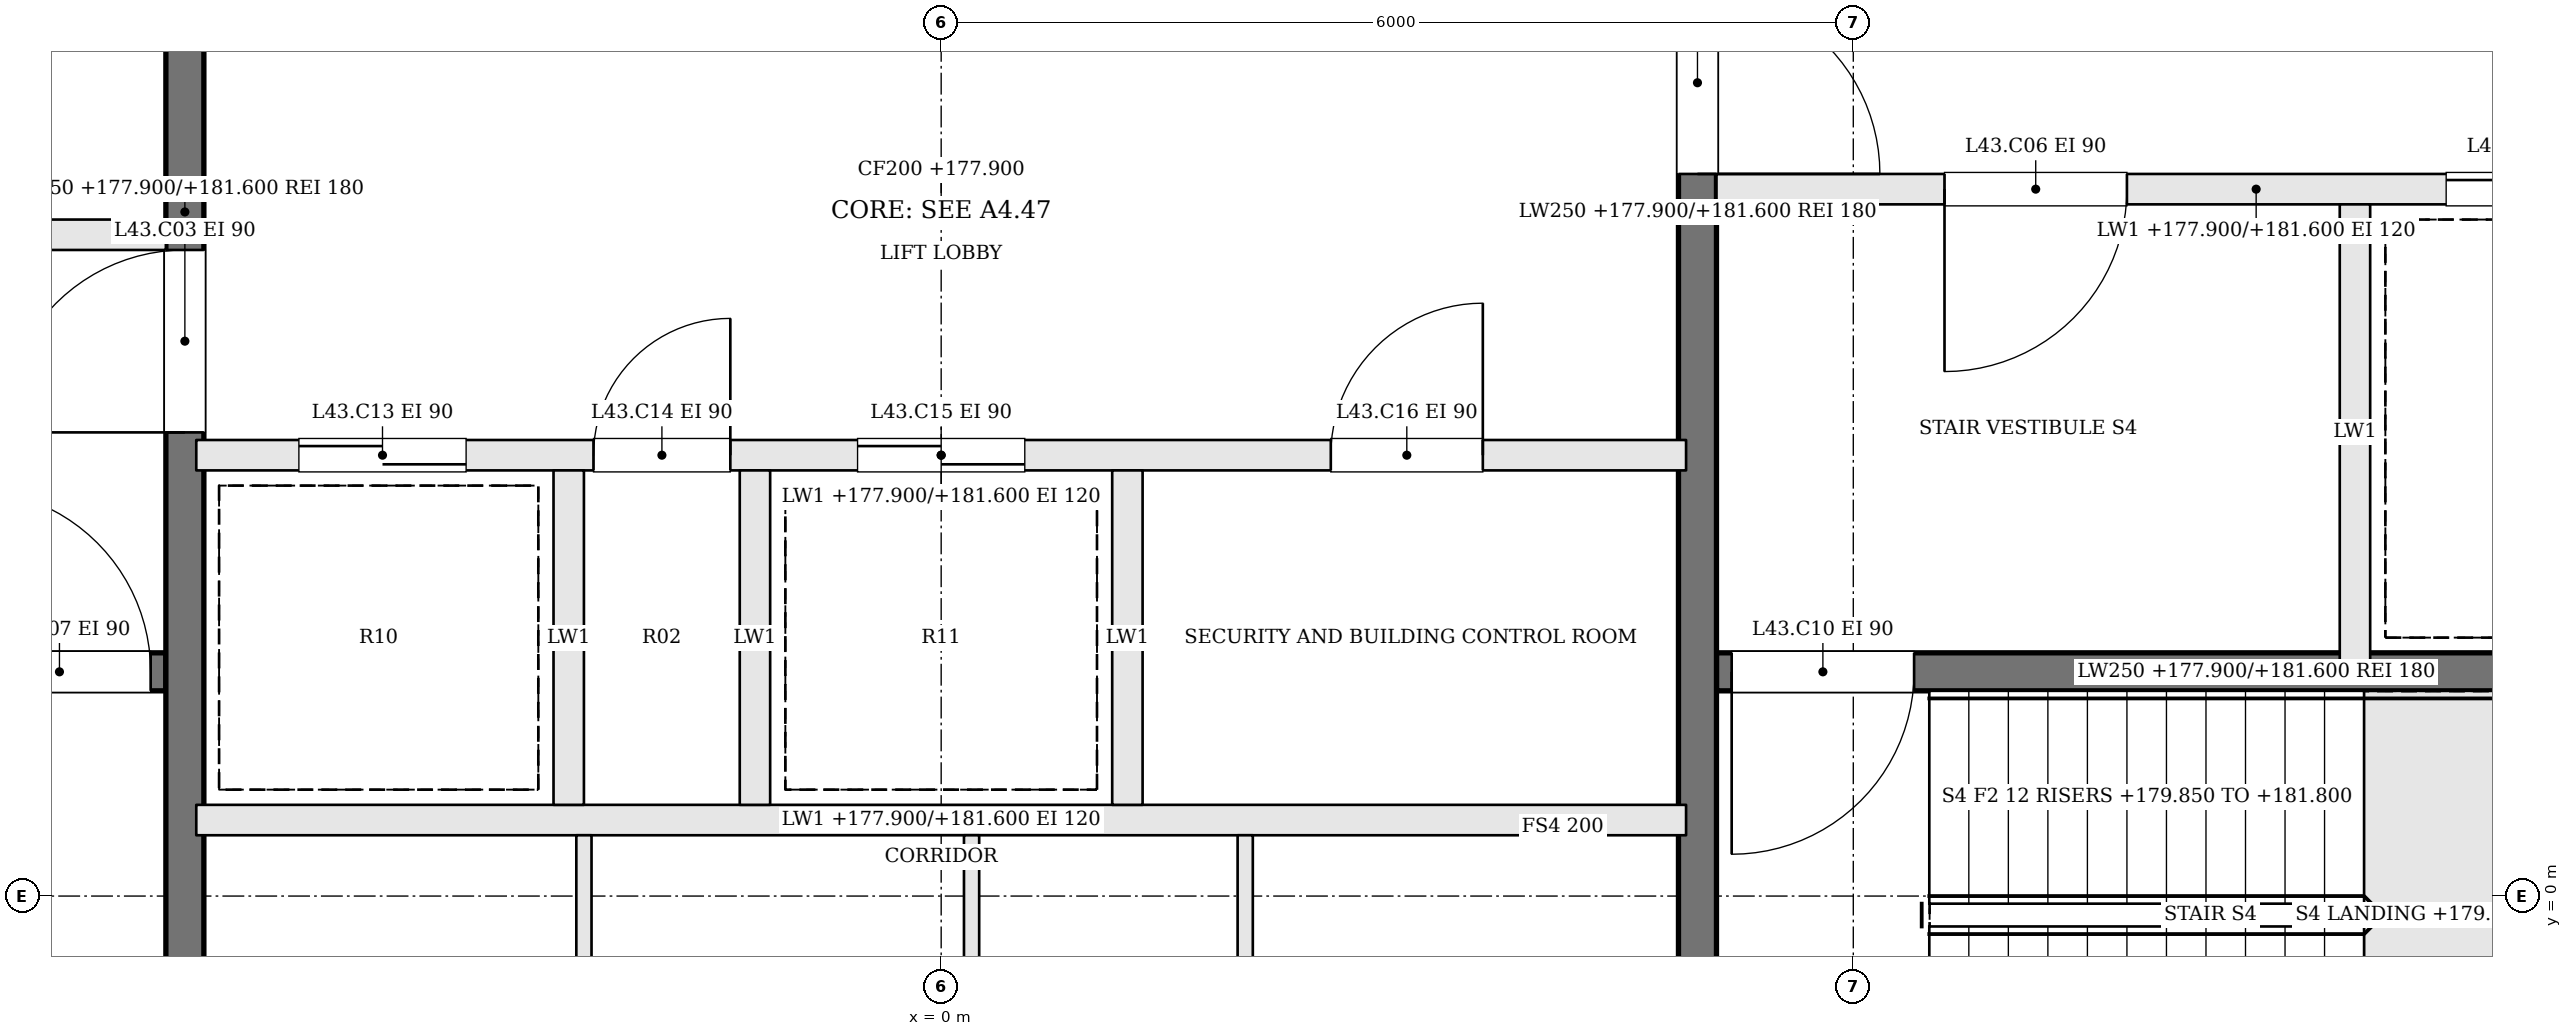
"""IFC4 building model, lengths in metres.
Left out: names, types, materials, properties, quantities, classifications, styles, units other than length and angle.
Written with IfcOpenShell. Run it as: python <this file> out.ifc"""

import sys

from ifc_helpers import new_model, si_unit, direction, frame, frame_2d, origin, place, context, subcontext, project, spatial, rectangle, extrude, element, fill, save


model = new_model("IFC4")
c1 = context("Model", 3, precision=1e-05, world=origin(), true_north=direction((0.0, 1.0)))
c2 = subcontext(c1, "Body", "Model", "MODEL_VIEW")
j1 = project(units=[si_unit("LENGTHUNIT", "METRE"), si_unit("PLANEANGLEUNIT", "RADIAN")], contexts=[c1])
p1 = place(None, origin())
s1 = spatial("IfcSite", under=j1, at=p1, CompositionType="ELEMENT")
p2 = place(p1, origin())
s2 = spatial("IfcBuilding", under=s1, at=p2, CompositionType="ELEMENT")
p3 = place(p2, frame((0.0, 0.0, 177.9)))
s3 = spatial("IfcBuildingStorey", under=s2, at=p3, CompositionType="ELEMENT", Elevation=177.9)
p4 = place(p3, frame((-12.2, 1.475, 0.0), z_axis=(0.0, 0.0, 1.0), x_axis=(1.0, 0.0, 0.0)))
e1 = element("IfcWall", 1, at=p4, inside=s3, PredefinedType="SOLIDWALL", context=c2, shape_type="SweptSolid", body=[
    extrude(rectangle(XDim=7.1, YDim=0.25, at=frame_2d((3.55, 0.0))), origin(), (0.0, 0.0, 1.0), 3.7),
])
p5 = place(p4, frame((5.8, 0.0, 0.0)))
e2 = element("IfcOpeningElement", 2, at=p5, cuts=e1, PredefinedType="OPENING", context=c2, shape_type="SweptSolid", body=[
    extrude(rectangle(XDim=1.2, YDim=2.1, at=frame_2d((0.6, 1.05))), frame((0.0, 0.135, 0.0), z_axis=(0.0, -1.0, 0.0), x_axis=(1.0, 0.0, 0.0)), (0.0, 0.0, 1.0), 0.27),
])
p6 = place(p3, frame((-12.2, 4.35, 0.0), z_axis=(0.0, 0.0, 1.0), x_axis=(1.0, 0.0, 0.0)))
e3 = element("IfcWall", 3, at=p6, inside=s3, PredefinedType="SOLIDWALL", context=c2, shape_type="SweptSolid", body=[
    extrude(rectangle(XDim=7.1, YDim=0.2, at=frame_2d((3.55, 0.0))), origin(), (0.0, 0.0, 1.0), 3.7),
])
p7 = place(p6, frame((4.4, 0.0, 0.0)))
e4 = element("IfcOpeningElement", 4, at=p7, cuts=e3, PredefinedType="OPENING", context=c2, shape_type="SweptSolid", body=[
    extrude(rectangle(XDim=1.2, YDim=2.1, at=frame_2d((0.6, 1.05))), frame((0.0, 0.11, 0.0), z_axis=(0.0, -1.0, 0.0), x_axis=(1.0, 0.0, 0.0)), (0.0, 0.0, 1.0), 0.22),
])
p8 = place(p6, frame((1.1, 0.0, 0.0)))
e5 = element("IfcOpeningElement", 5, at=p8, cuts=e3, PredefinedType="OPENING", context=c2, shape_type="SweptSolid", body=[
    extrude(rectangle(XDim=1.2, YDim=2.1, at=frame_2d((0.6, 1.05))), frame((0.0, 0.11, 0.0), z_axis=(0.0, -1.0, 0.0), x_axis=(1.0, 0.0, 0.0)), (0.0, 0.0, 1.0), 0.22),
])
p9 = place(p3, frame((12.2, 4.65, 0.0), z_axis=(0.0, 0.0, 1.0), x_axis=(-1.0, 0.0, 0.0)))
e6 = element("IfcWall", 6, at=p9, inside=s3, PredefinedType="SOLIDWALL", context=c2, shape_type="SweptSolid", body=[
    extrude(rectangle(XDim=7.1, YDim=0.2, at=frame_2d((3.55, 0.0))), origin(), (0.0, 0.0, 1.0), 3.7),
])
p10 = place(p9, frame((4.4, 0.0, 0.0)))
e7 = element("IfcOpeningElement", 7, at=p10, cuts=e6, PredefinedType="OPENING", context=c2, shape_type="SweptSolid", body=[
    extrude(rectangle(XDim=1.2, YDim=2.1, at=frame_2d((0.6, 1.05))), frame((0.0, 0.11, 0.0), z_axis=(0.0, -1.0, 0.0), x_axis=(1.0, 0.0, 0.0)), (0.0, 0.0, 1.0), 0.22),
])
p11 = place(p9, frame((1.1, 0.0, 0.0)))
e8 = element("IfcOpeningElement", 8, at=p11, cuts=e6, PredefinedType="OPENING", context=c2, shape_type="SweptSolid", body=[
    extrude(rectangle(XDim=1.2, YDim=2.1, at=frame_2d((0.6, 1.05))), frame((0.0, 0.11, 0.0), z_axis=(0.0, -1.0, 0.0), x_axis=(1.0, 0.0, 0.0)), (0.0, 0.0, 1.0), 0.22),
])
p12 = place(p3, frame((12.2, 1.475, 0.0), z_axis=(0.0, 0.0, 1.0), x_axis=(-1.0, 0.0, 0.0)))
e9 = element("IfcWall", 9, at=p12, inside=s3, PredefinedType="SOLIDWALL", context=c2, shape_type="SweptSolid", body=[
    extrude(rectangle(XDim=7.1, YDim=0.25, at=frame_2d((3.55, 0.0))), origin(), (0.0, 0.0, 1.0), 3.7),
])
p13 = place(p12, frame((5.8, 0.0, 0.0)))
e10 = element("IfcOpeningElement", 10, at=p13, cuts=e9, PredefinedType="OPENING", context=c2, shape_type="SweptSolid", body=[
    extrude(rectangle(XDim=1.2, YDim=2.1, at=frame_2d((0.6, 1.05))), frame((0.0, 0.135, 0.0), z_axis=(0.0, -1.0, 0.0), x_axis=(1.0, 0.0, 0.0)), (0.0, 0.0, 1.0), 0.27),
])
p14 = place(p3, frame((9.3, 4.55, 0.0), z_axis=(0.0, 0.0, 1.0), x_axis=(0.0, -1.0, 0.0)))
e11 = element("IfcWall", 11, at=p14, inside=s3, PredefinedType="SOLIDWALL", context=c2, shape_type="SweptSolid", body=[
    extrude(rectangle(XDim=3.0, YDim=0.2, at=frame_2d((1.5, 0.0))), origin(), (0.0, 0.0, 1.0), 3.7),
])
p15 = place(p3, frame((-4.975, -2.2, 0.0), z_axis=(0.0, 0.0, 1.0), x_axis=(0.0, 1.0, 0.0)))
e12 = element("IfcWall", 12, at=p15, inside=s3, PredefinedType="SOLIDWALL", context=c2, shape_type="SweptSolid", body=[
    extrude(rectangle(XDim=13.4, YDim=0.25, at=frame_2d((6.7, 0.0))), origin(), (0.0, 0.0, 1.0), 3.7),
])
p16 = place(p15, frame((5.25, 0.0, 0.0)))
e13 = element("IfcOpeningElement", 13, at=p16, cuts=e12, PredefinedType="OPENING", context=c2, shape_type="SweptSolid", body=[
    extrude(rectangle(XDim=1.2, YDim=2.1, at=frame_2d((0.6, 1.05))), frame((0.0, 0.135, 0.0), z_axis=(0.0, -1.0, 0.0), x_axis=(1.0, 0.0, 0.0)), (0.0, 0.0, 1.0), 0.27),
])
p17 = place(p3, frame((4.975, 11.2, 0.0), z_axis=(0.0, 0.0, 1.0), x_axis=(0.0, -1.0, 0.0)))
e14 = element("IfcWall", 14, at=p17, inside=s3, PredefinedType="SOLIDWALL", context=c2, shape_type="SweptSolid", body=[
    extrude(rectangle(XDim=13.4, YDim=0.25, at=frame_2d((6.7, 0.0))), origin(), (0.0, 0.0, 1.0), 3.7),
])
p18 = place(p17, frame((5.25, 0.0, 0.0)))
e15 = element("IfcOpeningElement", 15, at=p18, cuts=e14, PredefinedType="OPENING", context=c2, shape_type="SweptSolid", body=[
    extrude(rectangle(XDim=1.2, YDim=2.1, at=frame_2d((0.6, 1.05))), frame((0.0, 0.135, 0.0), z_axis=(0.0, -1.0, 0.0), x_axis=(1.0, 0.0, 0.0)), (0.0, 0.0, 1.0), 0.27),
])
p19 = place(p3, frame((-4.9, 0.5, 0.0), z_axis=(0.0, 0.0, 1.0), x_axis=(1.0, 0.0, 0.0)))
e16 = element("IfcWall", 16, at=p19, inside=s3, PredefinedType="SOLIDWALL", context=c2, shape_type="SweptSolid", body=[
    extrude(rectangle(XDim=9.8, YDim=0.2, at=frame_2d((4.9, 0.0))), origin(), (0.0, 0.0, 1.0), 3.7),
])
p20 = place(p3, frame((-4.9, 2.9, 0.0), z_axis=(0.0, 0.0, 1.0), x_axis=(1.0, 0.0, 0.0)))
e17 = element("IfcWall", 17, at=p20, inside=s3, PredefinedType="SOLIDWALL", context=c2, shape_type="SweptSolid", body=[
    extrude(rectangle(XDim=9.8, YDim=0.2, at=frame_2d((4.9, 0.0))), origin(), (0.0, 0.0, 1.0), 3.7),
])
p21 = place(p20, frame((0.675, 0.0, 0.0)))
e18 = element("IfcOpeningElement", 18, at=p21, cuts=e17, PredefinedType="OPENING", context=c2, shape_type="SweptSolid", body=[
    extrude(rectangle(XDim=1.1, YDim=2.1, at=frame_2d((0.55, 1.05))), frame((0.0, 0.11, 0.0), z_axis=(0.0, -1.0, 0.0), x_axis=(1.0, 0.0, 0.0)), (0.0, 0.0, 1.0), 0.22),
])
p22 = place(p20, frame((2.613, 0.0, 0.0)))
e19 = element("IfcOpeningElement", 19, at=p22, cuts=e17, PredefinedType="OPENING", context=c2, shape_type="SweptSolid", body=[
    extrude(rectangle(XDim=0.9, YDim=2.1, at=frame_2d((0.45, 1.05))), frame((0.0, 0.11, 0.0), z_axis=(0.0, -1.0, 0.0), x_axis=(1.0, 0.0, 0.0)), (0.0, 0.0, 1.0), 0.22),
])
p23 = place(p20, frame((4.35, 0.0, 0.0)))
e20 = element("IfcOpeningElement", 20, at=p23, cuts=e17, PredefinedType="OPENING", context=c2, shape_type="SweptSolid", body=[
    extrude(rectangle(XDim=1.1, YDim=2.1, at=frame_2d((0.55, 1.05))), frame((0.0, 0.11, 0.0), z_axis=(0.0, -1.0, 0.0), x_axis=(1.0, 0.0, 0.0)), (0.0, 0.0, 1.0), 0.22),
])
p24 = place(p20, frame((7.463, 0.0, 0.0)))
e21 = element("IfcOpeningElement", 21, at=p24, cuts=e17, PredefinedType="OPENING", context=c2, shape_type="SweptSolid", body=[
    extrude(rectangle(XDim=1.0, YDim=2.1, at=frame_2d((0.5, 1.05))), frame((0.0, 0.11, 0.0), z_axis=(0.0, -1.0, 0.0), x_axis=(1.0, 0.0, 0.0)), (0.0, 0.0, 1.0), 0.22),
])
for number, where, z_axis, x_axis in (
    (22, (-2.45, 0.6, 0.0), (0.0, 0.0, 1.0), (0.0, 1.0, 0.0)),
    (23, (-1.225, 0.6, 0.0), (0.0, 0.0, 1.0), (0.0, 1.0, 0.0)),
    (24, (1.225, 0.6, 0.0), (0.0, 0.0, 1.0), (0.0, 1.0, 0.0)),
):
    element("IfcWall", number, at=place(p3, frame(where, z_axis=z_axis, x_axis=x_axis)), inside=s3, PredefinedType="SOLIDWALL", context=c2, shape_type="SweptSolid", body=[
        extrude(rectangle(XDim=2.2, YDim=0.2, at=frame_2d((1.1, 0.0))), origin(), (0.0, 0.0, 1.0), 3.7),
    ])
for number, where, z_axis, x_axis in (
    (25, (-2.35, -2.2, 0.0), (0.0, 0.0, 1.0), (0.0, 1.0, 0.0)),
    (26, (0.2, -2.2, 0.0), (0.0, 0.0, 1.0), (0.0, 1.0, 0.0)),
    (27, (2.0, -2.2, 0.0), (0.0, 0.0, 1.0), (0.0, 1.0, 0.0)),
):
    element("IfcWall", number, at=place(p3, frame(where, z_axis=z_axis, x_axis=x_axis)), inside=s3, PredefinedType="PARTITIONING", context=c2, shape_type="SweptSolid", body=[
        extrude(rectangle(XDim=2.6, YDim=0.1, at=frame_2d((1.3, 0.0))), origin(), (0.0, 0.0, 1.0), 3.7),
    ])
p25 = place(p16, origin())
e28 = element("IfcDoor", 28, at=p25, inside=s3, OperationType="SINGLE_SWING_LEFT", PredefinedType="DOOR", context=c2, shape_type="SweptSolid", body=[
    extrude(rectangle(XDim=1.2, YDim=2.1, at=frame_2d((0.6, 1.05))), frame((0.0, 0.025, 0.0), z_axis=(0.0, -1.0, 0.0), x_axis=(1.0, 0.0, 0.0)), (0.0, 0.0, 1.0), 0.05),
])
fill(e13, e28)
p26 = place(p18, origin())
e29 = element("IfcDoor", 29, at=p26, inside=s3, OperationType="SINGLE_SWING_RIGHT", PredefinedType="DOOR", context=c2, shape_type="SweptSolid", body=[
    extrude(rectangle(XDim=1.2, YDim=2.1, at=frame_2d((0.6, 1.05))), frame((0.0, 0.025, 0.0), z_axis=(0.0, -1.0, 0.0), x_axis=(1.0, 0.0, 0.0)), (0.0, 0.0, 1.0), 0.05),
])
fill(e15, e29)
p27 = place(p10, origin())
e30 = element("IfcDoor", 30, at=p27, inside=s3, OperationType="SINGLE_SWING_RIGHT", PredefinedType="DOOR", context=c2, shape_type="SweptSolid", body=[
    extrude(rectangle(XDim=1.2, YDim=2.1, at=frame_2d((0.6, 1.05))), frame((0.0, 0.025, 0.0), z_axis=(0.0, -1.0, 0.0), x_axis=(1.0, 0.0, 0.0)), (0.0, 0.0, 1.0), 0.05),
])
fill(e7, e30)
p28 = place(p5, origin())
e31 = element("IfcDoor", 31, at=p28, inside=s3, OperationType="SINGLE_SWING_LEFT", PredefinedType="DOOR", context=c2, shape_type="SweptSolid", body=[
    extrude(rectangle(XDim=1.2, YDim=2.1, at=frame_2d((0.6, 1.05))), frame((0.0, 0.025, 0.0), z_axis=(0.0, -1.0, 0.0), x_axis=(1.0, 0.0, 0.0)), (0.0, 0.0, 1.0), 0.05),
])
fill(e2, e31)
p29 = place(p13, origin())
e32 = element("IfcDoor", 32, at=p29, inside=s3, OperationType="SINGLE_SWING_RIGHT", PredefinedType="DOOR", context=c2, shape_type="SweptSolid", body=[
    extrude(rectangle(XDim=1.2, YDim=2.1, at=frame_2d((0.6, 1.05))), frame((0.0, 0.025, 0.0), z_axis=(0.0, -1.0, 0.0), x_axis=(1.0, 0.0, 0.0)), (0.0, 0.0, 1.0), 0.05),
])
fill(e10, e32)
p30 = place(p11, origin())
e33 = element("IfcDoor", 33, at=p30, inside=s3, OperationType="SLIDING_TO_RIGHT", PredefinedType="DOOR", context=c2, shape_type="SweptSolid", body=[
    extrude(rectangle(XDim=1.2, YDim=2.1, at=frame_2d((0.6, 1.05))), frame((0.0, 0.025, 0.0), z_axis=(0.0, -1.0, 0.0), x_axis=(1.0, 0.0, 0.0)), (0.0, 0.0, 1.0), 0.05),
])
fill(e8, e33)
p31 = place(p21, origin())
e34 = element("IfcDoor", 34, at=p31, inside=s3, OperationType="SLIDING_TO_RIGHT", PredefinedType="DOOR", context=c2, shape_type="SweptSolid", body=[
    extrude(rectangle(XDim=1.1, YDim=2.1, at=frame_2d((0.55, 1.05))), frame((0.0, 0.025, 0.0), z_axis=(0.0, -1.0, 0.0), x_axis=(1.0, 0.0, 0.0)), (0.0, 0.0, 1.0), 0.05),
])
fill(e18, e34)
p32 = place(p22, origin())
e35 = element("IfcDoor", 35, at=p32, inside=s3, OperationType="SINGLE_SWING_RIGHT", PredefinedType="DOOR", context=c2, shape_type="SweptSolid", body=[
    extrude(rectangle(XDim=0.9, YDim=2.1, at=frame_2d((0.45, 1.05))), frame((0.0, 0.025, 0.0), z_axis=(0.0, -1.0, 0.0), x_axis=(1.0, 0.0, 0.0)), (0.0, 0.0, 1.0), 0.05),
])
fill(e19, e35)
p33 = place(p23, origin())
e36 = element("IfcDoor", 36, at=p33, inside=s3, OperationType="SLIDING_TO_LEFT", PredefinedType="DOOR", context=c2, shape_type="SweptSolid", body=[
    extrude(rectangle(XDim=1.1, YDim=2.1, at=frame_2d((0.55, 1.05))), frame((0.0, 0.025, 0.0), z_axis=(0.0, -1.0, 0.0), x_axis=(1.0, 0.0, 0.0)), (0.0, 0.0, 1.0), 0.05),
])
fill(e20, e36)
p34 = place(p24, origin())
e37 = element("IfcDoor", 37, at=p34, inside=s3, OperationType="SINGLE_SWING_RIGHT", PredefinedType="DOOR", context=c2, shape_type="SweptSolid", body=[
    extrude(rectangle(XDim=1.0, YDim=2.1, at=frame_2d((0.5, 1.05))), frame((0.0, 0.025, 0.0), z_axis=(0.0, -1.0, 0.0), x_axis=(1.0, 0.0, 0.0)), (0.0, 0.0, 1.0), 0.05),
])
fill(e21, e37)
save(model, sys.argv[1])
